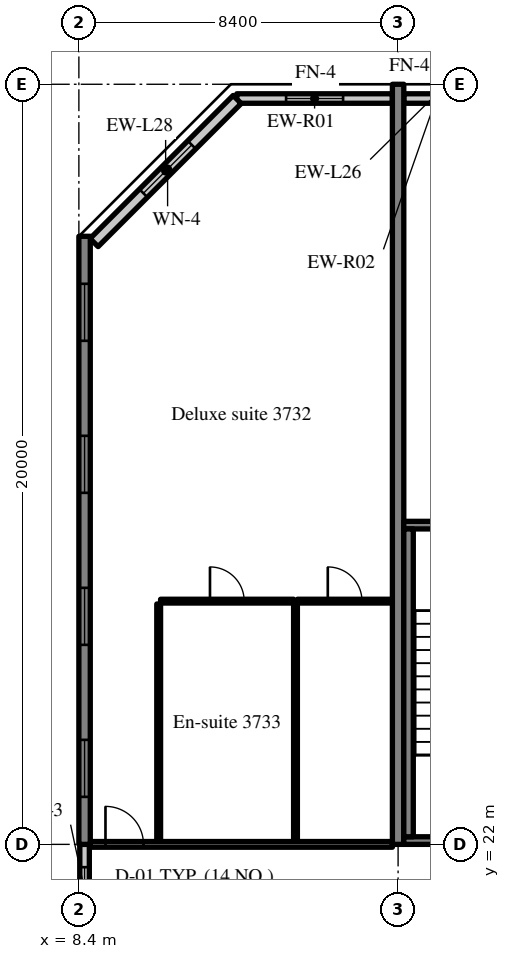
"""IFC4 building model, lengths in metres.
Left out: names, types, materials, properties, quantities, classifications, styles, units other than length and angle.
Written with IfcOpenShell. Run it as: python <this file> out.ifc"""

import sys

from ifc_helpers import new_model, si_unit, direction, frame, frame_2d, origin, place, context, subcontext, project, spatial, rectangle, extrude, source, transform, mapped, element, fill, save


model = new_model("IFC4")
c1 = context("Model", 3, precision=1e-05, world=origin(), true_north=direction((0.0, 1.0)))
c2 = subcontext(c1, "Body", "Model", "MODEL_VIEW")
j1 = project(units=[si_unit("LENGTHUNIT", "METRE"), si_unit("PLANEANGLEUNIT", "RADIAN")], contexts=[c1])
p1 = place(None, origin())
s1 = spatial("IfcSite", under=j1, at=p1, CompositionType="ELEMENT")
p2 = place(p1, origin())
s2 = spatial("IfcBuilding", under=s1, at=p2, CompositionType="ELEMENT")
p3 = place(p2, frame((0.0, 0.0, 155.4)))
s3 = spatial("IfcBuildingStorey", under=s2, at=p3, CompositionType="ELEMENT", Elevation=155.4)
m1 = source(origin(), c2, "Body", "SweptSolid", [
    extrude(rectangle(XDim=16.0, YDim=0.3, at=frame_2d((8.0, 0.0))), origin(), (0.0, 0.0, 1.0), 3.52),
])
p4 = place(p3, frame((8.55, 22.0, 0.0), z_axis=(0.0, 0.0, 1.0), x_axis=(0.0, 1.0, 0.0)))
e1 = element("IfcWall", 1, at=p4, inside=s3, PredefinedType="SHEAR", context=c2, shape_type="MappedRepresentation", body=[
    mapped(m1, transform((0.0, 0.0, 0.0), scale=1.0)),
])
m2 = source(origin(), c2, "Body", "SweptSolid", [
    extrude(rectangle(XDim=1.5, YDim=1.5, at=frame_2d((0.75, 0.75))), frame((0.0, 0.16, 0.0), z_axis=(0.0, -1.0, 0.0), x_axis=(1.0, 0.0, 0.0)), (0.0, 0.0, 1.0), 0.32),
])
p5 = place(p4, frame((1.25, 0.0, 0.9)))
e2 = element("IfcOpeningElement", 2, at=p5, cuts=e1, PredefinedType="OPENING", context=c2, shape_type="MappedRepresentation", body=[
    mapped(m2, transform((0.0, 0.0, 0.0), scale=1.0)),
])
p6 = place(p4, frame((5.25, 0.0, 0.9)))
e3 = element("IfcOpeningElement", 3, at=p6, cuts=e1, PredefinedType="OPENING", context=c2, shape_type="MappedRepresentation", body=[
    mapped(m2, transform((0.0, 0.0, 0.0), scale=1.0)),
])
p7 = place(p4, frame((9.25, 0.0, 0.9)))
e4 = element("IfcOpeningElement", 4, at=p7, cuts=e1, PredefinedType="OPENING", context=c2, shape_type="MappedRepresentation", body=[
    mapped(m2, transform((0.0, 0.0, 0.0), scale=1.0)),
])
p8 = place(p4, frame((13.25, 0.0, 0.9)))
e5 = element("IfcOpeningElement", 5, at=p8, cuts=e1, PredefinedType="OPENING", context=c2, shape_type="MappedRepresentation", body=[
    mapped(m2, transform((0.0, 0.0, 0.0), scale=1.0)),
])
m3 = source(origin(), c2, "Body", "SweptSolid", [
    extrude(rectangle(XDim=20.0, YDim=0.3, at=frame_2d((10.0, 0.0))), origin(), (0.0, 0.0, 1.0), 3.52),
])
p9 = place(p3, frame((16.8, 22.0, 0.0), z_axis=(0.0, 0.0, 1.0), x_axis=(0.0, 1.0, 0.0)))
e6 = element("IfcWall", 6, at=p9, inside=s3, PredefinedType="SHEAR", context=c2, shape_type="MappedRepresentation", body=[
    mapped(m3, transform((0.0, 0.0, 0.0), scale=1.0)),
])
m4 = source(origin(), c2, "Body", "SweptSolid", [
    extrude(rectangle(XDim=4.094, YDim=0.25, at=frame_2d((2.047, 0.0))), origin(), (0.0, 0.0, 1.0), 2.87),
])
p10 = place(p3, frame((16.65, 41.625, 0.0), z_axis=(0.0, 0.0, 1.0), x_axis=(-1.0, 0.0, 0.0)))
e7 = element("IfcWall", 7, at=p10, inside=s3, PredefinedType="SOLIDWALL", context=c2, shape_type="MappedRepresentation", body=[
    mapped(m4, transform((0.0, 0.0, 0.0), scale=1.0)),
])
m5 = source(origin(), c2, "Body", "SweptSolid", [
    extrude(rectangle(XDim=1.5, YDim=1.5, at=frame_2d((0.75, 0.75))), frame((0.0, 0.135, 0.0), z_axis=(0.0, -1.0, 0.0), x_axis=(1.0, 0.0, 0.0)), (0.0, 0.0, 1.0), 0.27),
])
p11 = place(p10, frame((1.297, 0.0, 0.9)))
e8 = element("IfcOpeningElement", 8, at=p11, cuts=e7, PredefinedType="OPENING", context=c2, shape_type="MappedRepresentation", body=[
    mapped(m5, transform((0.0, 0.0, 0.0), scale=1.0)),
])
m6 = source(origin(), c2, "Body", "SweptSolid", [
    extrude(rectangle(XDim=1.708, YDim=0.25, at=frame_2d((0.854, 0.0))), origin(), (0.0, 0.0, 1.0), 2.87),
])
p12 = place(p3, frame((18.658, 41.625, 0.0), z_axis=(0.0, 0.0, 1.0), x_axis=(-1.0, 0.0, 0.0)))
e9 = element("IfcWall", 9, at=p12, inside=s3, PredefinedType="SOLIDWALL", context=c2, shape_type="MappedRepresentation", body=[
    mapped(m6, transform((0.0, 0.0, 0.0), scale=1.0)),
])
m7 = source(origin(), c2, "Body", "SweptSolid", [
    extrude(rectangle(XDim=5.326, YDim=0.3, at=frame_2d((2.663, 0.0))), origin(), (0.0, 0.0, 1.0), 3.52),
])
p13 = place(p3, frame((12.566, 41.6, 0.0), z_axis=(0.0, 0.0, 1.0), x_axis=(-0.707083859269, -0.707129702361, 0.0)))
e10 = element("IfcWall", 10, at=p13, inside=s3, PredefinedType="SOLIDWALL", context=c2, shape_type="MappedRepresentation", body=[
    mapped(m7, transform((0.0, 0.0, 0.0), scale=1.0)),
])
m8 = source(origin(), c2, "Body", "SweptSolid", [
    extrude(rectangle(XDim=1.8, YDim=1.5, at=frame_2d((0.9, 0.75))), frame((0.0, 0.16, 0.0), z_axis=(0.0, -1.0, 0.0), x_axis=(1.0, 0.0, 0.0)), (0.0, 0.0, 1.0), 0.32),
])
p14 = place(p13, frame((1.689, 0.0, 0.9)))
e11 = element("IfcOpeningElement", 11, at=p14, cuts=e10, PredefinedType="OPENING", context=c2, shape_type="MappedRepresentation", body=[
    mapped(m8, transform((0.0, 0.0, 0.0), scale=1.0)),
])
m9 = source(origin(), c2, "Body", "SweptSolid", [
    extrude(rectangle(XDim=2.4, YDim=0.25, at=frame_2d((1.2, 0.0))), origin(), (0.0, 0.0, 1.0), 2.62),
])
p15 = place(p3, frame((8.55, 19.6, 0.0), z_axis=(0.0, 0.0, 1.0), x_axis=(0.0, 1.0, 0.0)))
e12 = element("IfcWall", 12, at=p15, inside=s3, PredefinedType="SOLIDWALL", context=c2, shape_type="MappedRepresentation", body=[
    mapped(m9, transform((0.0, 0.0, 0.0), scale=1.0)),
])
m10 = source(origin(), c2, "Body", "SweptSolid", [
    extrude(rectangle(XDim=1.2, YDim=1.5, at=frame_2d((0.6, 0.75))), frame((0.0, 0.135, 0.0), z_axis=(0.0, -1.0, 0.0), x_axis=(1.0, 0.0, 0.0)), (0.0, 0.0, 1.0), 0.27),
])
p16 = place(p15, frame((0.6, 0.0, 0.9)))
e13 = element("IfcOpeningElement", 13, at=p16, cuts=e12, PredefinedType="OPENING", context=c2, shape_type="MappedRepresentation", body=[
    mapped(m10, transform((0.0, 0.0, 0.0), scale=1.0)),
])
m11 = source(origin(), c2, "Body", "SweptSolid", [
    extrude(rectangle(XDim=8.25, YDim=0.2, at=frame_2d((4.125, 0.0))), origin(), (0.0, 0.0, 1.0), 3.52),
])
p17 = place(p3, frame((16.95, 22.1, 0.0), z_axis=(0.0, 0.0, 1.0), x_axis=(1.0, 0.0, 0.0)))
e14 = element("IfcWall", 14, at=p17, inside=s3, PredefinedType="SOLIDWALL", context=c2, shape_type="MappedRepresentation", body=[
    mapped(m11, transform((0.0, 0.0, 0.0), scale=1.0)),
])
m12 = source(origin(), c2, "Body", "SweptSolid", [
    extrude(rectangle(XDim=1.2, YDim=2.1, at=frame_2d((0.6, 1.05))), frame((0.0, 0.11, 0.0), z_axis=(0.0, -1.0, 0.0), x_axis=(1.0, 0.0, 0.0)), (0.0, 0.0, 1.0), 0.22),
])
p18 = place(p17, frame((6.05, 0.0, 0.0)))
e15 = element("IfcOpeningElement", 15, at=p18, cuts=e14, PredefinedType="OPENING", context=c2, shape_type="MappedRepresentation", body=[
    mapped(m12, transform((0.0, 0.0, 0.0), scale=1.0)),
])
p19 = place(p3, frame((16.95, 30.4, 0.0), z_axis=(0.0, 0.0, 1.0), x_axis=(1.0, 0.0, 0.0)))
e16 = element("IfcWall", 16, at=p19, inside=s3, PredefinedType="SOLIDWALL", context=c2, shape_type="MappedRepresentation", body=[
    mapped(m11, transform((0.0, 0.0, 0.0), scale=1.0)),
])
m13 = source(origin(), c2, "Body", "SweptSolid", [
    extrude(rectangle(XDim=1.0, YDim=2.1, at=frame_2d((0.5, 1.05))), frame((0.0, 0.11, 0.0), z_axis=(0.0, -1.0, 0.0), x_axis=(1.0, 0.0, 0.0)), (0.0, 0.0, 1.0), 0.22),
])
p20 = place(p19, frame((6.15, 0.0, 0.0)))
e17 = element("IfcOpeningElement", 17, at=p20, cuts=e16, PredefinedType="OPENING", context=c2, shape_type="MappedRepresentation", body=[
    mapped(m13, transform((0.0, 0.0, 0.0), scale=1.0)),
])
m14 = source(origin(), c2, "Body", "SweptSolid", [
    extrude(rectangle(XDim=8.1, YDim=0.25, at=frame_2d((4.05, 0.0))), origin(), (0.0, 0.0, 1.0), 3.52),
])
p21 = place(p3, frame((17.075, 22.2, 0.0), z_axis=(0.0, 0.0, 1.0), x_axis=(0.0, 1.0, 0.0)))
e18 = element("IfcWall", 18, at=p21, inside=s3, PredefinedType="SOLIDWALL", context=c2, shape_type="MappedRepresentation", body=[
    mapped(m14, transform((0.0, 0.0, 0.0), scale=1.0)),
])
m15 = source(origin(), c2, "Body", "SweptSolid", [
    extrude(rectangle(XDim=6.25, YDim=0.1, at=frame_2d((3.125, 0.0))), origin(), (0.0, 0.0, 1.0), 3.52),
])
for number, where, z_axis, x_axis in (
    (19, (10.5, 22.075, 0.0), (0.0, 0.0, 1.0), (0.0, 1.0, 0.0)),
    (20, (14.1, 22.075, 0.0), (0.0, 0.0, 1.0), (0.0, 1.0, 0.0)),
):
    element("IfcWall", number, at=place(p3, frame(where, z_axis=z_axis, x_axis=x_axis)), inside=s3, PredefinedType="PARTITIONING", context=c2, shape_type="MappedRepresentation", body=[
        mapped(m15, transform((0.0, 0.0, 0.0), scale=1.0)),
    ])
m16 = source(origin(), c2, "Body", "SweptSolid", [
    extrude(rectangle(XDim=3.5, YDim=0.1, at=frame_2d((1.75, 0.0))), origin(), (0.0, 0.0, 1.0), 3.52),
])
p22 = place(p3, frame((10.55, 28.4, 0.0), z_axis=(0.0, 0.0, 1.0), x_axis=(1.0, 0.0, 0.0)))
e21 = element("IfcWall", 21, at=p22, inside=s3, PredefinedType="PARTITIONING", context=c2, shape_type="MappedRepresentation", body=[
    mapped(m16, transform((0.0, 0.0, 0.0), scale=1.0)),
])
m17 = source(origin(), c2, "Body", "SweptSolid", [
    extrude(rectangle(XDim=0.9, YDim=2.1, at=frame_2d((0.45, 1.05))), frame((0.0, 0.06, 0.0), z_axis=(0.0, -1.0, 0.0), x_axis=(1.0, 0.0, 0.0)), (0.0, 0.0, 1.0), 0.12),
])
p23 = place(p22, frame((1.3, 0.0, 0.0)))
e22 = element("IfcOpeningElement", 22, at=p23, cuts=e21, PredefinedType="OPENING", context=c2, shape_type="MappedRepresentation", body=[
    mapped(m17, transform((0.0, 0.0, 0.0), scale=1.0)),
])
m18 = source(origin(), c2, "Body", "SweptSolid", [
    extrude(rectangle(XDim=2.5, YDim=0.1, at=frame_2d((1.25, 0.0))), origin(), (0.0, 0.0, 1.0), 3.52),
])
p24 = place(p3, frame((14.15, 28.4, 0.0), z_axis=(0.0, 0.0, 1.0), x_axis=(1.0, 0.0, 0.0)))
e23 = element("IfcWall", 23, at=p24, inside=s3, PredefinedType="PARTITIONING", context=c2, shape_type="MappedRepresentation", body=[
    mapped(m18, transform((0.0, 0.0, 0.0), scale=1.0)),
])
p25 = place(p24, frame((0.8, 0.0, 0.0)))
e24 = element("IfcOpeningElement", 24, at=p25, cuts=e23, PredefinedType="OPENING", context=c2, shape_type="MappedRepresentation", body=[
    mapped(m17, transform((0.0, 0.0, 0.0), scale=1.0)),
])
m19 = source(origin(), c2, "Body", "SweptSolid", [
    extrude(rectangle(XDim=7.95, YDim=0.15, at=frame_2d((3.975, 0.0))), origin(), (0.0, 0.0, 1.0), 2.82),
])
p26 = place(p3, frame((8.7, 22.0, 0.0), z_axis=(0.0, 0.0, 1.0), x_axis=(1.0, 0.0, 0.0)))
e25 = element("IfcWall", 25, at=p26, inside=s3, PredefinedType="PARTITIONING", context=c2, shape_type="MappedRepresentation", body=[
    mapped(m19, transform((0.0, 0.0, 0.0), scale=1.0)),
])
m20 = source(origin(), c2, "Body", "SweptSolid", [
    extrude(rectangle(XDim=1.0, YDim=2.1, at=frame_2d((0.5, 1.05))), frame((0.0, 0.085, 0.0), z_axis=(0.0, -1.0, 0.0), x_axis=(1.0, 0.0, 0.0)), (0.0, 0.0, 1.0), 0.17),
])
p27 = place(p26, frame((0.4, 0.0, 0.0)))
e26 = element("IfcOpeningElement", 26, at=p27, cuts=e25, PredefinedType="OPENING", context=c2, shape_type="MappedRepresentation", body=[
    mapped(m20, transform((0.0, 0.0, 0.0), scale=1.0)),
])
m21 = source(origin(), c2, "Body", "SweptSolid", [
    extrude(rectangle(XDim=1.5, YDim=1.5, at=frame_2d((0.75, 0.75))), frame((0.0, 0.03, 0.0), z_axis=(0.0, -1.0, 0.0), x_axis=(1.0, 0.0, 0.0)), (0.0, 0.0, 1.0), 0.06),
])
p28 = place(p11, origin())
e27 = element("IfcWindow", 27, at=p28, inside=s3, PartitioningType="SINGLE_PANEL", PredefinedType="WINDOW", context=c2, shape_type="MappedRepresentation", body=[
    mapped(m21, transform((0.0, 0.0, 0.0), scale=1.0)),
])
fill(e8, e27)
m22 = source(origin(), c2, "Body", "SweptSolid", [
    extrude(rectangle(XDim=1.8, YDim=1.5, at=frame_2d((0.9, 0.75))), frame((0.0, 0.03, 0.0), z_axis=(0.0, -1.0, 0.0), x_axis=(1.0, 0.0, 0.0)), (0.0, 0.0, 1.0), 0.06),
])
p29 = place(p14, origin())
e28 = element("IfcWindow", 28, at=p29, inside=s3, PartitioningType="SINGLE_PANEL", PredefinedType="WINDOW", context=c2, shape_type="MappedRepresentation", body=[
    mapped(m22, transform((0.0, 0.0, 0.0), scale=1.0)),
])
fill(e11, e28)
p30 = place(p5, origin())
e29 = element("IfcWindow", 29, at=p30, inside=s3, PartitioningType="SINGLE_PANEL", PredefinedType="WINDOW", context=c2, shape_type="MappedRepresentation", body=[
    mapped(m21, transform((0.0, 0.0, 0.0), scale=1.0)),
])
fill(e2, e29)
p31 = place(p6, origin())
e30 = element("IfcWindow", 30, at=p31, inside=s3, PartitioningType="SINGLE_PANEL", PredefinedType="WINDOW", context=c2, shape_type="MappedRepresentation", body=[
    mapped(m21, transform((0.0, 0.0, 0.0), scale=1.0)),
])
fill(e3, e30)
p32 = place(p7, origin())
e31 = element("IfcWindow", 31, at=p32, inside=s3, PartitioningType="SINGLE_PANEL", PredefinedType="WINDOW", context=c2, shape_type="MappedRepresentation", body=[
    mapped(m21, transform((0.0, 0.0, 0.0), scale=1.0)),
])
fill(e4, e31)
p33 = place(p8, origin())
e32 = element("IfcWindow", 32, at=p33, inside=s3, PartitioningType="SINGLE_PANEL", PredefinedType="WINDOW", context=c2, shape_type="MappedRepresentation", body=[
    mapped(m21, transform((0.0, 0.0, 0.0), scale=1.0)),
])
fill(e5, e32)
m23 = source(origin(), c2, "Body", "SweptSolid", [
    extrude(rectangle(XDim=1.2, YDim=1.5, at=frame_2d((0.6, 0.75))), frame((0.0, 0.03, 0.0), z_axis=(0.0, -1.0, 0.0), x_axis=(1.0, 0.0, 0.0)), (0.0, 0.0, 1.0), 0.06),
])
p34 = place(p16, origin())
e33 = element("IfcWindow", 33, at=p34, inside=s3, PartitioningType="SINGLE_PANEL", PredefinedType="WINDOW", context=c2, shape_type="MappedRepresentation", body=[
    mapped(m23, transform((0.0, 0.0, 0.0), scale=1.0)),
])
fill(e13, e33)
m24 = source(origin(), c2, "Body", "SweptSolid", [
    extrude(rectangle(XDim=0.9, YDim=2.1, at=frame_2d((0.45, 1.05))), frame((0.0, 0.025, 0.0), z_axis=(0.0, -1.0, 0.0), x_axis=(1.0, 0.0, 0.0)), (0.0, 0.0, 1.0), 0.05),
])
p35 = place(p23, origin())
e34 = element("IfcDoor", 34, at=p35, inside=s3, OperationType="SINGLE_SWING_LEFT", PredefinedType="DOOR", context=c2, shape_type="MappedRepresentation", body=[
    mapped(m24, transform((0.0, 0.0, 0.0), scale=1.0)),
])
fill(e22, e34)
p36 = place(p25, origin())
e35 = element("IfcDoor", 35, at=p36, inside=s3, OperationType="SINGLE_SWING_LEFT", PredefinedType="DOOR", context=c2, shape_type="MappedRepresentation", body=[
    mapped(m24, transform((0.0, 0.0, 0.0), scale=1.0)),
])
fill(e24, e35)
m25 = source(origin(), c2, "Body", "SweptSolid", [
    extrude(rectangle(XDim=1.0, YDim=2.1, at=frame_2d((0.5, 1.05))), frame((0.0, 0.025, 0.0), z_axis=(0.0, -1.0, 0.0), x_axis=(1.0, 0.0, 0.0)), (0.0, 0.0, 1.0), 0.05),
])
p37 = place(p27, origin())
e36 = element("IfcDoor", 36, at=p37, inside=s3, OperationType="SINGLE_SWING_LEFT", PredefinedType="DOOR", context=c2, shape_type="MappedRepresentation", body=[
    mapped(m25, transform((0.0, 0.0, 0.0), scale=1.0)),
])
fill(e26, e36)
save(model, sys.argv[1])
